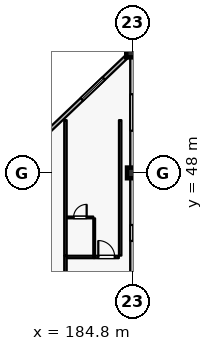
"""IFC4 building model, lengths in metres.
Left out: names, types, materials, properties, quantities, classifications, styles, units other than length and angle.
Written with IfcOpenShell. Run it as: python <this file> out.ifc"""

import sys

from ifc_helpers import new_model, si_unit, direction, frame, frame_2d, origin, origin_2d, place, context, subcontext, project, spatial, rectangle, extrude, element, fill, save


model = new_model("IFC4")
c1 = context("Model", 3, precision=1e-05, world=origin(), true_north=direction((0.0, 1.0)))
c2 = subcontext(c1, "Body", "Model", "MODEL_VIEW")
j1 = project(units=[si_unit("LENGTHUNIT", "METRE"), si_unit("PLANEANGLEUNIT", "RADIAN")], contexts=[c1])
p1 = place(None, origin())
s1 = spatial("IfcSite", under=j1, at=p1, CompositionType="ELEMENT")
p2 = place(p1, origin())
s2 = spatial("IfcBuilding", under=s1, at=p2, CompositionType="ELEMENT")
p3 = place(p2, frame((0.0, 0.0, 25.2)))
s3 = spatial("IfcBuildingStorey", under=s2, at=p3, CompositionType="ELEMENT", Elevation=25.2)
p4 = place(p3, frame((184.8, 56.0, 0.0), z_axis=(0.0, 0.0, 1.0), x_axis=(1.0, 0.0, 0.0)))
e1 = element("IfcColumn", 1, at=p4, inside=s3, PredefinedType="COLUMN", context=c2, shape_type="SweptSolid", body=[
    extrude(rectangle(XDim=0.8, YDim=0.8, at=origin_2d()), origin(), (0.0, 0.0, 1.0), 3.6),
])
p5 = place(p3, frame((184.8, 48.0, 0.0), z_axis=(0.0, 0.0, 1.0), x_axis=(1.0, 0.0, 0.0)))
e2 = element("IfcColumn", 2, at=p5, inside=s3, PredefinedType="COLUMN", context=c2, shape_type="SweptSolid", body=[
    extrude(rectangle(XDim=0.7, YDim=0.7, at=origin_2d()), origin(), (0.0, 0.0, 1.0), 3.6),
])
p6 = place(p3, frame((176.8, 48.381, 0.0), z_axis=(0.0, 0.0, 1.0), x_axis=(0.724145676014, 0.689647040094, 0.0)))
e3 = element("IfcWall", 3, at=p6, inside=s3, PredefinedType="SOLIDWALL", context=c2, shape_type="SweptSolid", body=[
    extrude(rectangle(XDim=10.495, YDim=0.24, at=frame_2d((5.248, 0.0))), origin(), (0.0, 0.0, 1.0), 2.89),
])
p7 = place(p6, frame((1.486, 0.0, 0.8)))
e4 = element("IfcOpeningElement", 4, at=p7, cuts=e3, PredefinedType="OPENING", context=c2, shape_type="SweptSolid", body=[
    extrude(rectangle(XDim=2.0, YDim=1.75, at=frame_2d((1.0, 0.875))), frame((0.0, 0.13, 0.0), z_axis=(0.0, -1.0, 0.0), x_axis=(1.0, 0.0, 0.0)), (0.0, 0.0, 1.0), 0.26),
])
p8 = place(p6, frame((6.457, 0.0, 0.8)))
e5 = element("IfcOpeningElement", 5, at=p8, cuts=e3, PredefinedType="OPENING", context=c2, shape_type="SweptSolid", body=[
    extrude(rectangle(XDim=2.0, YDim=1.75, at=frame_2d((1.0, 0.875))), frame((0.0, 0.13, 0.0), z_axis=(0.0, -1.0, 0.0), x_axis=(1.0, 0.0, 0.0)), (0.0, 0.0, 1.0), 0.26),
])
p9 = place(p3, frame((184.8, 55.6, 0.0), z_axis=(0.0, 0.0, 1.0), x_axis=(0.0, -1.0, 0.0)))
e6 = element("IfcWall", 6, at=p9, inside=s3, PredefinedType="SOLIDWALL", context=c2, shape_type="SweptSolid", body=[
    extrude(rectangle(XDim=7.25, YDim=0.28, at=frame_2d((3.625, 0.0))), origin(), (0.0, 0.0, 1.0), 2.7),
])
p10 = place(p9, frame((2.425, 0.0, 0.5)))
e7 = element("IfcOpeningElement", 7, at=p10, cuts=e6, PredefinedType="OPENING", context=c2, shape_type="SweptSolid", body=[
    extrude(rectangle(XDim=2.4, YDim=1.65, at=frame_2d((1.2, 0.825))), frame((0.0, 0.15, 0.0), z_axis=(0.0, -1.0, 0.0), x_axis=(1.0, 0.0, 0.0)), (0.0, 0.0, 1.0), 0.3),
])
p11 = place(p3, frame((184.8, 47.65, 0.0), z_axis=(0.0, 0.0, 1.0), x_axis=(0.0, -1.0, 0.0)))
e8 = element("IfcWall", 8, at=p11, inside=s3, PredefinedType="SOLIDWALL", context=c2, shape_type="SweptSolid", body=[
    extrude(rectangle(XDim=7.2, YDim=0.28, at=frame_2d((3.6, 0.0))), origin(), (0.0, 0.0, 1.0), 2.7),
])
p12 = place(p11, frame((3.075, 0.0, 0.5)))
e9 = element("IfcOpeningElement", 9, at=p12, cuts=e8, PredefinedType="OPENING", context=c2, shape_type="SweptSolid", body=[
    extrude(rectangle(XDim=1.05, YDim=1.65, at=frame_2d((0.525, 0.825))), frame((0.0, 0.15, 0.0), z_axis=(0.0, -1.0, 0.0), x_axis=(1.0, 0.0, 0.0)), (0.0, 0.0, 1.0), 0.3),
])
p13 = place(p3, frame((180.4, 39.13, 0.0), z_axis=(0.0, 0.0, 1.0), x_axis=(0.0, 1.0, 0.0)))
e10 = element("IfcWall", 10, at=p13, inside=s3, PredefinedType="PARTITIONING", context=c2, shape_type="SweptSolid", body=[
    extrude(rectangle(XDim=3.42, YDim=0.16, at=frame_2d((1.71, 0.0))), origin(), (0.0, 0.0, 1.0), 3.335),
])
p14 = place(p3, frame((180.49, 42.47, 0.0), z_axis=(0.0, 0.0, 1.0), x_axis=(1.0, 0.0, 0.0)))
e11 = element("IfcWall", 11, at=p14, inside=s3, PredefinedType="PARTITIONING", context=c2, shape_type="SweptSolid", body=[
    extrude(rectangle(XDim=1.79, YDim=0.16, at=frame_2d((0.895, 0.0))), origin(), (0.0, 0.0, 1.0), 3.335),
])
p15 = place(p3, frame((182.29, 42.47, 0.0), z_axis=(0.0, 0.0, 1.0), x_axis=(1.0, 0.0, 0.0)))
e12 = element("IfcWall", 12, at=p15, inside=s3, PredefinedType="PARTITIONING", context=c2, shape_type="SweptSolid", body=[
    extrude(rectangle(XDim=1.62, YDim=0.16, at=frame_2d((0.81, 0.0))), origin(), (0.0, 0.0, 1.0), 3.335),
])
p16 = place(p15, frame((0.27, 0.0, 0.0)))
e13 = element("IfcOpeningElement", 13, at=p16, cuts=e12, PredefinedType="OPENING", context=c2, shape_type="SweptSolid", body=[
    extrude(rectangle(XDim=1.08, YDim=2.3, at=frame_2d((0.54, 1.15))), frame((0.0, 0.09, 0.0), z_axis=(0.0, -1.0, 0.0), x_axis=(1.0, 0.0, 0.0)), (0.0, 0.0, 1.0), 0.18),
])
p17 = place(p3, frame((182.29, 42.56, 0.0), z_axis=(0.0, 0.0, 1.0), x_axis=(0.0, 1.0, 0.0)))
e14 = element("IfcWall", 14, at=p17, inside=s3, PredefinedType="PARTITIONING", context=c2, shape_type="SweptSolid", body=[
    extrude(rectangle(XDim=2.45, YDim=0.115, at=frame_2d((1.225, 0.0))), origin(), (0.0, 0.0, 1.0), 3.335),
])
p18 = place(p3, frame((180.5, 45.07, 0.0), z_axis=(0.0, 0.0, 1.0), x_axis=(1.0, 0.0, 0.0)))
e15 = element("IfcWall", 15, at=p18, inside=s3, PredefinedType="PARTITIONING", context=c2, shape_type="SweptSolid", body=[
    extrude(rectangle(XDim=1.73, YDim=0.115, at=frame_2d((0.865, 0.0))), origin(), (0.0, 0.0, 1.0), 3.335),
])
p19 = place(p18, frame((0.435, 0.0, 0.0)))
e16 = element("IfcOpeningElement", 16, at=p19, cuts=e15, PredefinedType="OPENING", context=c2, shape_type="SweptSolid", body=[
    extrude(rectangle(XDim=0.86, YDim=2.12, at=frame_2d((0.43, 1.06))), frame((0.0, 0.067, 0.0), z_axis=(0.0, -1.0, 0.0), x_axis=(1.0, 0.0, 0.0)), (0.0, 0.0, 1.0), 0.135),
])
for number, where, z_axis, x_axis in (
    (17, (180.4, 42.56, 0.0), (0.0, 0.0, 1.0), (0.0, 1.0, 0.0)),
    (18, (184.0, 42.56, 0.0), (0.0, 0.0, 1.0), (0.0, 1.0, 0.0)),
):
    element("IfcWall", number, at=place(p3, frame(where, z_axis=z_axis, x_axis=x_axis)), inside=s3, PredefinedType="PARTITIONING", context=c2, shape_type="SweptSolid", body=[
        extrude(rectangle(XDim=8.91, YDim=0.16, at=frame_2d((4.455, 0.0))), origin(), (0.0, 0.0, 1.0), 3.335),
    ])
p20 = place(p8, origin())
e19 = element("IfcWindow", 19, at=p20, inside=s3, PartitioningType="DOUBLE_PANEL_VERTICAL", PredefinedType="WINDOW", context=c2, shape_type="SweptSolid", body=[
    extrude(rectangle(XDim=2.0, YDim=1.75, at=frame_2d((1.0, 0.875))), frame((0.0, 0.03, 0.0), z_axis=(0.0, -1.0, 0.0), x_axis=(1.0, 0.0, 0.0)), (0.0, 0.0, 1.0), 0.06),
])
fill(e5, e19)
p21 = place(p10, origin())
e20 = element("IfcWindow", 20, at=p21, inside=s3, PartitioningType="DOUBLE_PANEL_VERTICAL", PredefinedType="WINDOW", context=c2, shape_type="SweptSolid", body=[
    extrude(rectangle(XDim=2.4, YDim=1.65, at=frame_2d((1.2, 0.825))), frame((0.0, 0.03, 0.0), z_axis=(0.0, -1.0, 0.0), x_axis=(1.0, 0.0, 0.0)), (0.0, 0.0, 1.0), 0.06),
])
fill(e7, e20)
p22 = place(p12, origin())
e21 = element("IfcWindow", 21, at=p22, inside=s3, PartitioningType="SINGLE_PANEL", PredefinedType="WINDOW", context=c2, shape_type="SweptSolid", body=[
    extrude(rectangle(XDim=1.05, YDim=1.65, at=frame_2d((0.525, 0.825))), frame((0.0, 0.03, 0.0), z_axis=(0.0, -1.0, 0.0), x_axis=(1.0, 0.0, 0.0)), (0.0, 0.0, 1.0), 0.06),
])
fill(e9, e21)
p23 = place(p16, origin())
e22 = element("IfcDoor", 22, at=p23, inside=s3, OperationType="SINGLE_SWING_LEFT", PredefinedType="DOOR", context=c2, shape_type="SweptSolid", body=[
    extrude(rectangle(XDim=1.08, YDim=2.3, at=frame_2d((0.54, 1.15))), frame((0.0, 0.025, 0.0), z_axis=(0.0, -1.0, 0.0), x_axis=(1.0, 0.0, 0.0)), (0.0, 0.0, 1.0), 0.05),
])
fill(e13, e22)
p24 = place(p19, origin())
e23 = element("IfcDoor", 23, at=p24, inside=s3, OperationType="SINGLE_SWING_RIGHT", PredefinedType="DOOR", context=c2, shape_type="SweptSolid", body=[
    extrude(rectangle(XDim=0.86, YDim=2.12, at=frame_2d((0.43, 1.06))), frame((0.0, 0.025, 0.0), z_axis=(0.0, -1.0, 0.0), x_axis=(1.0, 0.0, 0.0)), (0.0, 0.0, 1.0), 0.05),
])
fill(e16, e23)
save(model, sys.argv[1])
